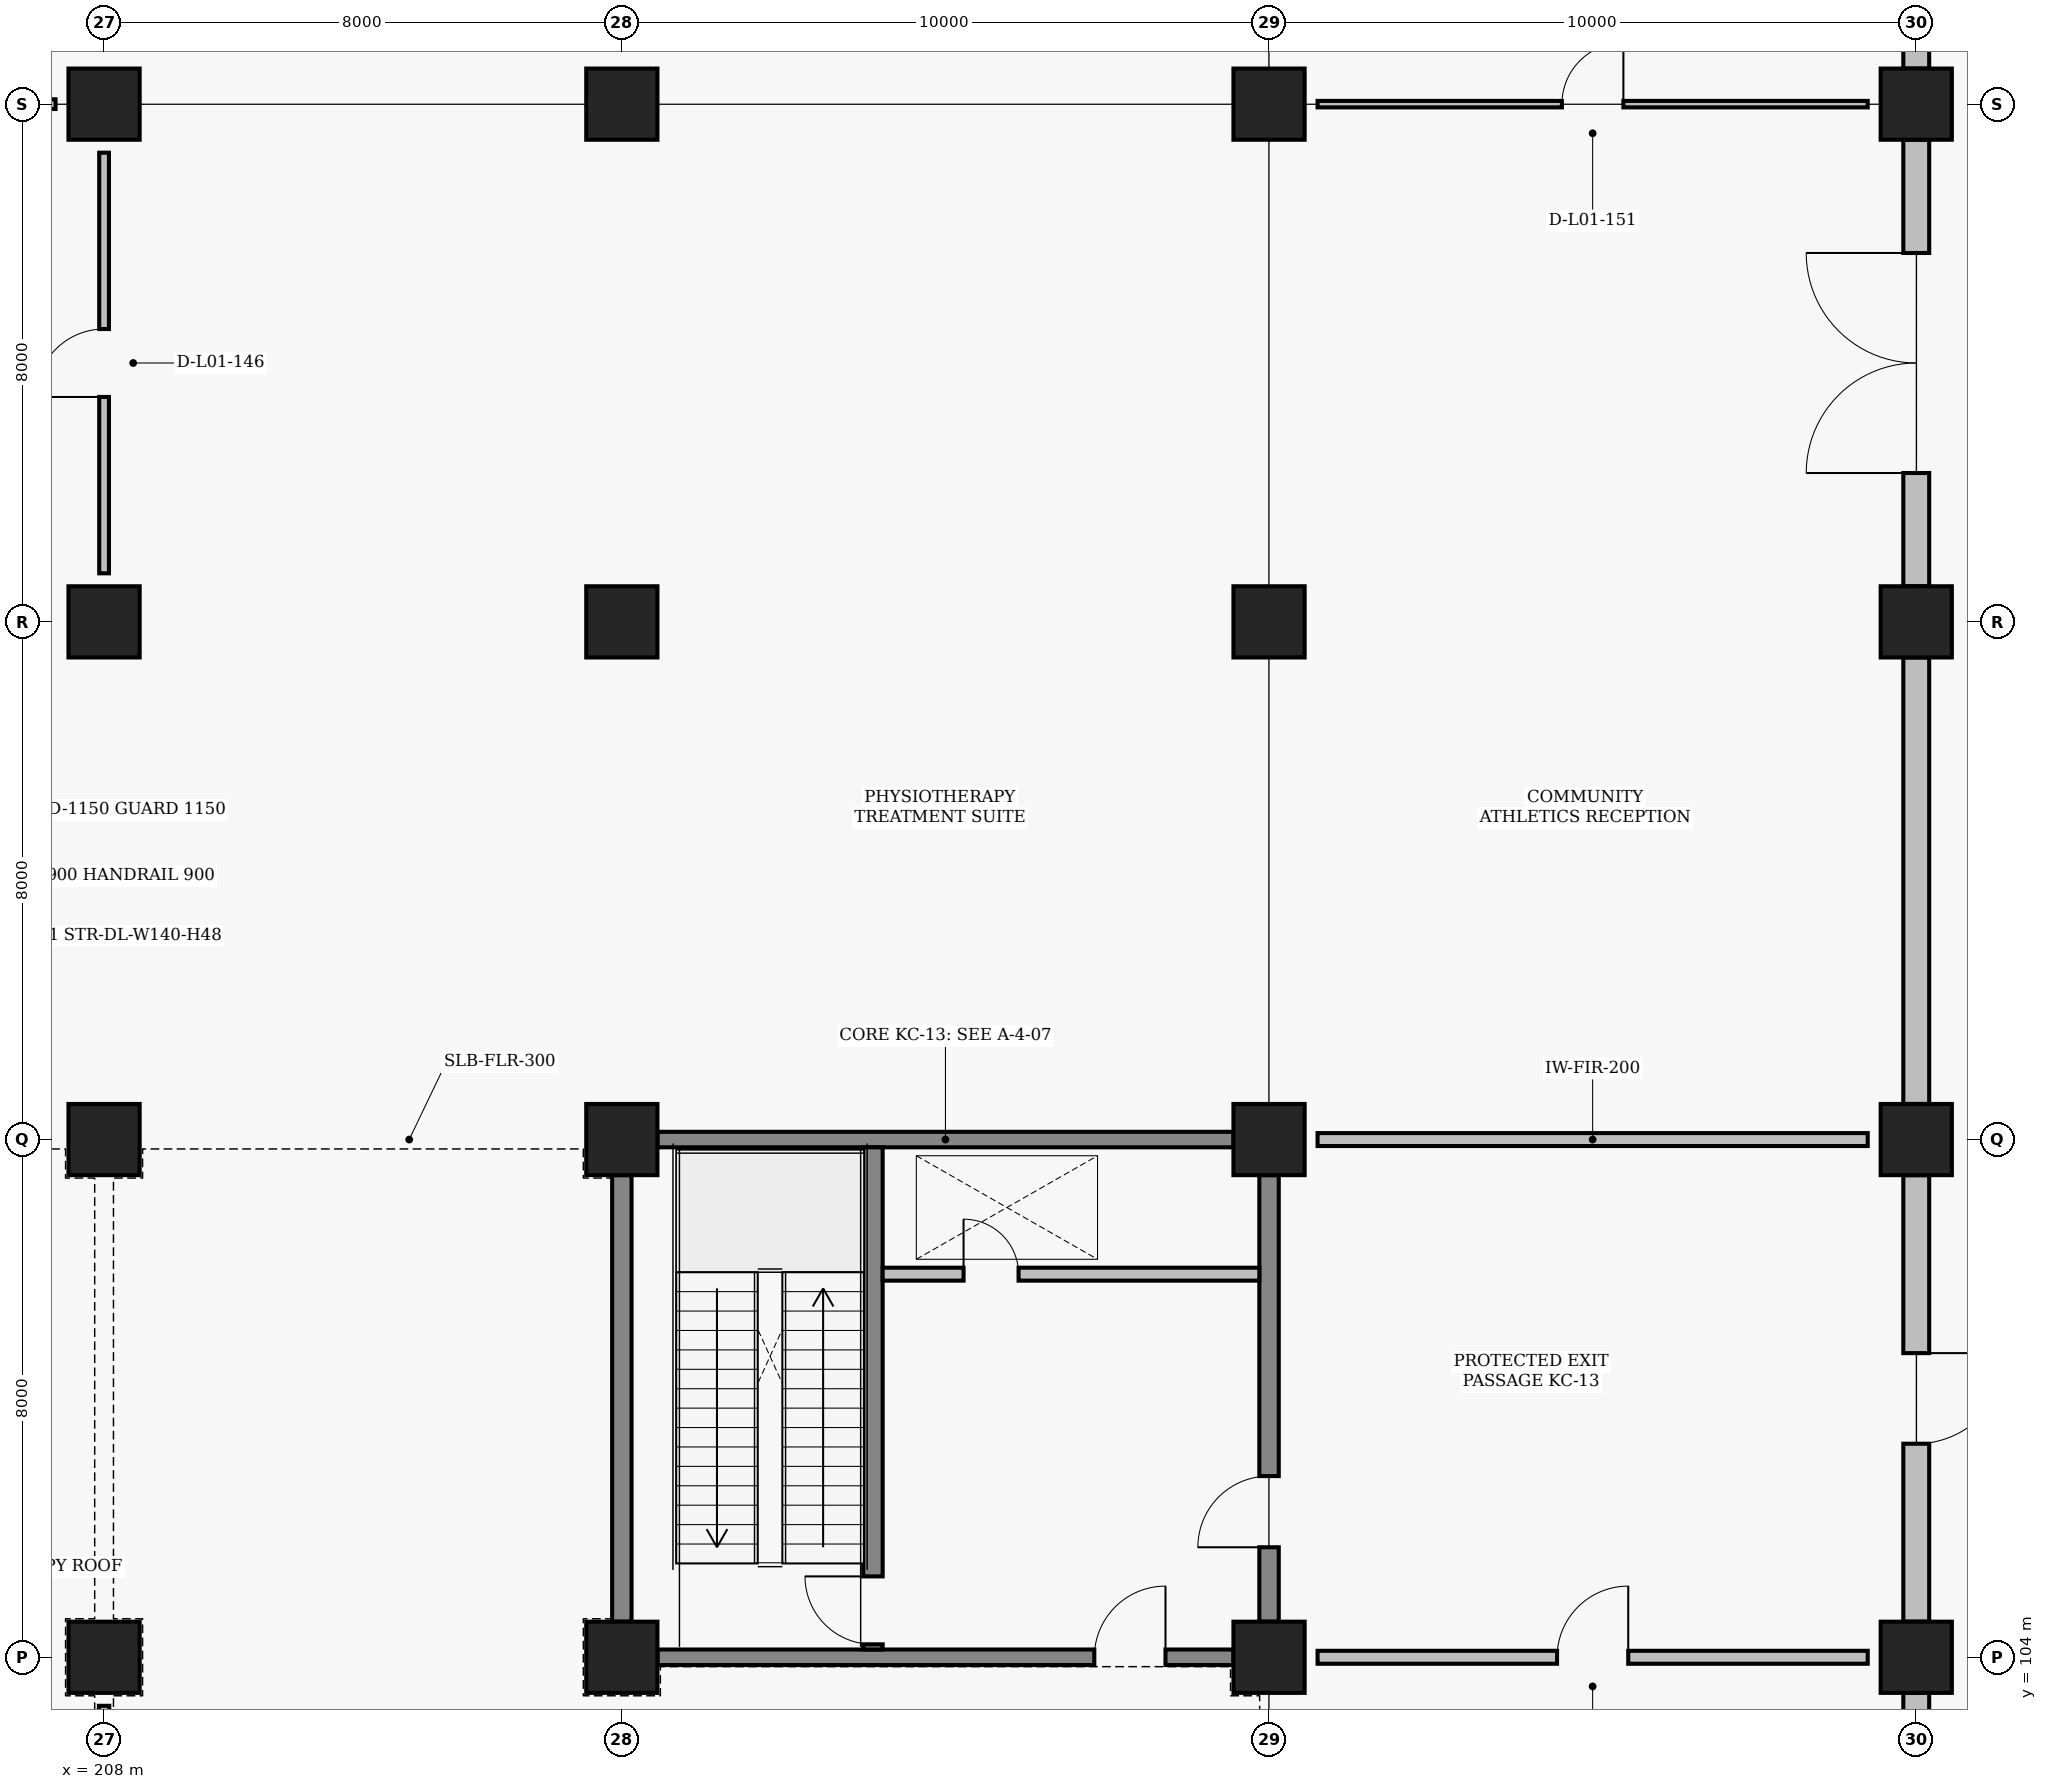
"""IFC4 building model, lengths in metres.
Left out: names, types, materials, properties, quantities, classifications, styles, units other than length and angle.
Written with IfcOpenShell. Run it as: python <this file> out.ifc"""

import sys

from ifc_helpers import new_model, si_unit, direction, frame, frame_2d, origin, origin_2d, place, context, subcontext, project, spatial, rectangle, extrude, element, fill, save


model = new_model("IFC4")
c1 = context("Model", 3, precision=1e-05, world=origin(), true_north=direction((0.0, 1.0)))
c2 = subcontext(c1, "Body", "Model", "MODEL_VIEW")
j1 = project(units=[si_unit("LENGTHUNIT", "METRE"), si_unit("PLANEANGLEUNIT", "RADIAN")], contexts=[c1])
p1 = place(None, origin())
s1 = spatial("IfcSite", under=j1, at=p1, CompositionType="ELEMENT")
p2 = place(p1, origin())
s2 = spatial("IfcBuilding", under=s1, at=p2, CompositionType="ELEMENT")
p3 = place(p2, origin())
s3 = spatial("IfcBuildingStorey", under=s2, at=p3, CompositionType="ELEMENT", Elevation=0.0)
for number, where, z_axis, x_axis in (
    (1, (208.0, 104.0, 0.0), (0.0, 0.0, 1.0), (1.0, 0.0, 0.0)),
    (2, (208.0, 112.0, 0.0), (0.0, 0.0, 1.0), (1.0, 0.0, 0.0)),
    (3, (208.0, 120.0, 0.0), (0.0, 0.0, 1.0), (1.0, 0.0, 0.0)),
    (4, (208.0, 128.0, 0.0), (0.0, 0.0, 1.0), (1.0, 0.0, 0.0)),
    (5, (216.0, 104.0, 0.0), (0.0, 0.0, 1.0), (1.0, 0.0, 0.0)),
    (6, (216.0, 112.0, 0.0), (0.0, 0.0, 1.0), (1.0, 0.0, 0.0)),
    (7, (216.0, 120.0, 0.0), (0.0, 0.0, 1.0), (1.0, 0.0, 0.0)),
    (8, (216.0, 128.0, 0.0), (0.0, 0.0, 1.0), (1.0, 0.0, 0.0)),
    (9, (226.0, 104.0, 0.0), (0.0, 0.0, 1.0), (1.0, 0.0, 0.0)),
    (10, (226.0, 112.0, 0.0), (0.0, 0.0, 1.0), (1.0, 0.0, 0.0)),
    (11, (226.0, 120.0, 0.0), (0.0, 0.0, 1.0), (1.0, 0.0, 0.0)),
    (12, (226.0, 128.0, 0.0), (0.0, 0.0, 1.0), (1.0, 0.0, 0.0)),
    (13, (236.0, 104.0, 0.0), (0.0, 0.0, 1.0), (1.0, 0.0, 0.0)),
    (14, (236.0, 112.0, 0.0), (0.0, 0.0, 1.0), (1.0, 0.0, 0.0)),
    (15, (236.0, 120.0, 0.0), (0.0, 0.0, 1.0), (1.0, 0.0, 0.0)),
    (16, (236.0, 128.0, 0.0), (0.0, 0.0, 1.0), (1.0, 0.0, 0.0)),
):
    element("IfcColumn", number, at=place(p3, frame(where, z_axis=z_axis, x_axis=x_axis)), inside=s3, PredefinedType="COLUMN", context=c2, shape_type="SweptSolid", body=[
        extrude(rectangle(XDim=1.1, YDim=1.1, at=origin_2d()), origin(), (0.0, 0.0, 1.0), 4.8),
    ])
p4 = place(p3, frame((236.0, 96.55, 0.0), z_axis=(0.0, 0.0, 1.0), x_axis=(0.0, 1.0, 0.0)))
e17 = element("IfcWall", 17, at=p4, inside=s3, PredefinedType="SOLIDWALL", context=c2, shape_type="SweptSolid", body=[
    extrude(rectangle(XDim=6.9, YDim=0.4, at=frame_2d((3.45, 0.0))), origin(), (0.0, 0.0, 1.0), 3.81),
])
p5 = place(p4, frame((2.15, 0.0, 0.0)))
e18 = element("IfcOpeningElement", 18, at=p5, cuts=e17, PredefinedType="OPENING", context=c2, shape_type="SweptSolid", body=[
    extrude(rectangle(XDim=2.6, YDim=2.5, at=frame_2d((1.3, 1.25))), frame((0.0, 0.21, 0.0), z_axis=(0.0, -1.0, 0.0), x_axis=(1.0, 0.0, 0.0)), (0.0, 0.0, 1.0), 0.42),
])
p6 = place(p3, frame((236.0, 111.45, 0.0), z_axis=(0.0, 0.0, 1.0), x_axis=(0.0, -1.0, 0.0)))
e19 = element("IfcWall", 19, at=p6, inside=s3, PredefinedType="SOLIDWALL", context=c2, shape_type="SweptSolid", body=[
    extrude(rectangle(XDim=6.9, YDim=0.4, at=frame_2d((3.45, 0.0))), origin(), (0.0, 0.0, 1.0), 3.81),
])
p7 = place(p6, frame((2.75, 0.0, 0.0)))
e20 = element("IfcOpeningElement", 20, at=p7, cuts=e19, PredefinedType="OPENING", context=c2, shape_type="SweptSolid", body=[
    extrude(rectangle(XDim=1.4, YDim=2.2, at=frame_2d((0.7, 1.1))), frame((0.0, 0.21, 0.0), z_axis=(0.0, -1.0, 0.0), x_axis=(1.0, 0.0, 0.0)), (0.0, 0.0, 1.0), 0.42),
])
p8 = place(p3, frame((236.0, 112.55, 0.0), z_axis=(0.0, 0.0, 1.0), x_axis=(0.0, 1.0, 0.0)))
e21 = element("IfcWall", 21, at=p8, inside=s3, PredefinedType="SOLIDWALL", context=c2, shape_type="SweptSolid", body=[
    extrude(rectangle(XDim=6.9, YDim=0.4, at=frame_2d((3.45, 0.0))), origin(), (0.0, 0.0, 1.0), 3.81),
])
p9 = place(p3, frame((236.0, 120.55, 0.0), z_axis=(0.0, 0.0, 1.0), x_axis=(0.0, 1.0, 0.0)))
e22 = element("IfcWall", 22, at=p9, inside=s3, PredefinedType="SOLIDWALL", context=c2, shape_type="SweptSolid", body=[
    extrude(rectangle(XDim=6.9, YDim=0.4, at=frame_2d((3.45, 0.0))), origin(), (0.0, 0.0, 1.0), 3.81),
])
p10 = place(p9, frame((1.75, 0.0, 0.0)))
e23 = element("IfcOpeningElement", 23, at=p10, cuts=e22, PredefinedType="OPENING", context=c2, shape_type="SweptSolid", body=[
    extrude(rectangle(XDim=3.4, YDim=2.75, at=frame_2d((1.7, 1.375))), frame((0.0, 0.21, 0.0), z_axis=(0.0, -1.0, 0.0), x_axis=(1.0, 0.0, 0.0)), (0.0, 0.0, 1.0), 0.42),
])
p11 = place(p3, frame((236.0, 128.55, 0.0), z_axis=(0.0, 0.0, 1.0), x_axis=(0.0, 1.0, 0.0)))
e24 = element("IfcWall", 24, at=p11, inside=s3, PredefinedType="SOLIDWALL", context=c2, shape_type="SweptSolid", body=[
    extrude(rectangle(XDim=6.9, YDim=0.4, at=frame_2d((3.45, 0.0))), origin(), (0.0, 0.0, 1.0), 3.81),
])
p12 = place(p3, frame((216.55, 104.0, 0.0), z_axis=(0.0, 0.0, 1.0), x_axis=(1.0, 0.0, 0.0)))
e25 = element("IfcWall", 25, at=p12, inside=s3, PredefinedType="SHEAR", context=c2, shape_type="SweptSolid", body=[
    extrude(rectangle(XDim=8.9, YDim=0.24, at=frame_2d((4.45, 0.0))), origin(), (0.0, 0.0, 1.0), 3.81),
])
p13 = place(p12, frame((6.75, 0.0, 0.0)))
e26 = element("IfcOpeningElement", 26, at=p13, cuts=e25, PredefinedType="OPENING", context=c2, shape_type="SweptSolid", body=[
    extrude(rectangle(XDim=1.1, YDim=2.2, at=frame_2d((0.55, 1.1))), frame((0.0, 0.13, 0.0), z_axis=(0.0, -1.0, 0.0), x_axis=(1.0, 0.0, 0.0)), (0.0, 0.0, 1.0), 0.26),
])
p14 = place(p3, frame((216.55, 112.0, 0.0), z_axis=(0.0, 0.0, 1.0), x_axis=(1.0, 0.0, 0.0)))
e27 = element("IfcWall", 27, at=p14, inside=s3, PredefinedType="SHEAR", context=c2, shape_type="SweptSolid", body=[
    extrude(rectangle(XDim=8.9, YDim=0.24, at=frame_2d((4.45, 0.0))), origin(), (0.0, 0.0, 1.0), 3.66),
])
p15 = place(p3, frame((216.0, 104.55, 0.0), z_axis=(0.0, 0.0, 1.0), x_axis=(0.0, 1.0, 0.0)))
e28 = element("IfcWall", 28, at=p15, inside=s3, PredefinedType="SHEAR", context=c2, shape_type="SweptSolid", body=[
    extrude(rectangle(XDim=6.9, YDim=0.3, at=frame_2d((3.45, 0.0))), origin(), (0.0, 0.0, 1.0), 3.66),
])
p16 = place(p3, frame((226.0, 104.55, 0.0), z_axis=(0.0, 0.0, 1.0), x_axis=(0.0, 1.0, 0.0)))
e29 = element("IfcWall", 29, at=p16, inside=s3, PredefinedType="SHEAR", context=c2, shape_type="SweptSolid", body=[
    extrude(rectangle(XDim=6.9, YDim=0.3, at=frame_2d((3.45, 0.0))), origin(), (0.0, 0.0, 1.0), 3.81),
])
p17 = place(p16, frame((1.15, 0.0, 0.0)))
e30 = element("IfcOpeningElement", 30, at=p17, cuts=e29, PredefinedType="OPENING", context=c2, shape_type="SweptSolid", body=[
    extrude(rectangle(XDim=1.1, YDim=2.2, at=frame_2d((0.55, 1.1))), frame((0.0, 0.16, 0.0), z_axis=(0.0, -1.0, 0.0), x_axis=(1.0, 0.0, 0.0)), (0.0, 0.0, 1.0), 0.32),
])
p18 = place(p3, frame((219.88, 104.12, 0.0), z_axis=(0.0, 0.0, 1.0), x_axis=(0.0, 1.0, 0.0)))
e31 = element("IfcWall", 31, at=p18, inside=s3, PredefinedType="SHEAR", context=c2, shape_type="SweptSolid", body=[
    extrude(rectangle(XDim=7.76, YDim=0.3, at=frame_2d((3.88, 0.0))), origin(), (0.0, 0.0, 1.0), 4.01),
])
p19 = place(p18, frame((0.08, 0.0, 0.0)))
e32 = element("IfcOpeningElement", 32, at=p19, cuts=e31, PredefinedType="OPENING", context=c2, shape_type="SweptSolid", body=[
    extrude(rectangle(XDim=1.05, YDim=2.15, at=frame_2d((0.525, 1.075))), frame((0.0, 0.16, 0.0), z_axis=(0.0, -1.0, 0.0), x_axis=(1.0, 0.0, 0.0)), (0.0, 0.0, 1.0), 0.32),
])
p20 = place(p3, frame((220.03, 109.92, 0.0), z_axis=(0.0, 0.0, 1.0), x_axis=(1.0, 0.0, 0.0)))
e33 = element("IfcWall", 33, at=p20, inside=s3, PredefinedType="PARTITIONING", context=c2, shape_type="SweptSolid", body=[
    extrude(rectangle(XDim=5.82, YDim=0.2, at=frame_2d((2.91, 0.0))), origin(), (0.0, 0.0, 1.0), 3.81),
])
p21 = place(p20, frame((1.25, 0.0, 0.0)))
e34 = element("IfcOpeningElement", 34, at=p21, cuts=e33, PredefinedType="OPENING", context=c2, shape_type="SweptSolid", body=[
    extrude(rectangle(XDim=0.85, YDim=2.05, at=frame_2d((0.425, 1.025))), frame((0.0, 0.11, 0.0), z_axis=(0.0, -1.0, 0.0), x_axis=(1.0, 0.0, 0.0)), (0.0, 0.0, 1.0), 0.22),
])
p22 = place(p3, frame((226.75, 104.0, 0.0), z_axis=(0.0, 0.0, 1.0), x_axis=(1.0, 0.0, 0.0)))
e35 = element("IfcWall", 35, at=p22, inside=s3, PredefinedType="PARTITIONING", context=c2, shape_type="SweptSolid", body=[
    extrude(rectangle(XDim=8.5, YDim=0.2, at=frame_2d((4.25, 0.0))), origin(), (0.0, 0.0, 1.0), 3.81),
])
p23 = place(p22, frame((3.7, 0.0, 0.0)))
e36 = element("IfcOpeningElement", 36, at=p23, cuts=e35, PredefinedType="OPENING", context=c2, shape_type="SweptSolid", body=[
    extrude(rectangle(XDim=1.1, YDim=2.2, at=frame_2d((0.55, 1.1))), frame((0.0, 0.11, 0.0), z_axis=(0.0, -1.0, 0.0), x_axis=(1.0, 0.0, 0.0)), (0.0, 0.0, 1.0), 0.22),
])
p24 = place(p3, frame((226.75, 112.0, 0.0), z_axis=(0.0, 0.0, 1.0), x_axis=(1.0, 0.0, 0.0)))
e37 = element("IfcWall", 37, at=p24, inside=s3, PredefinedType="PARTITIONING", context=c2, shape_type="SweptSolid", body=[
    extrude(rectangle(XDim=8.5, YDim=0.2, at=frame_2d((4.25, 0.0))), origin(), (0.0, 0.0, 1.0), 3.81),
])
p25 = place(p3, frame((200.75, 128.0, 0.0), z_axis=(0.0, 0.0, 1.0), x_axis=(1.0, 0.0, 0.0)))
e38 = element("IfcWall", 38, at=p25, inside=s3, PredefinedType="PARTITIONING", context=c2, shape_type="SweptSolid", body=[
    extrude(rectangle(XDim=6.5, YDim=0.15, at=frame_2d((3.25, 0.0))), origin(), (0.0, 0.0, 1.0), 3.91),
])
p26 = place(p25, frame((2.725, 0.0, 0.0)))
e39 = element("IfcOpeningElement", 39, at=p26, cuts=e38, PredefinedType="OPENING", context=c2, shape_type="SweptSolid", body=[
    extrude(rectangle(XDim=1.05, YDim=2.15, at=frame_2d((0.525, 1.075))), frame((0.0, 0.085, 0.0), z_axis=(0.0, -1.0, 0.0), x_axis=(1.0, 0.0, 0.0)), (0.0, 0.0, 1.0), 0.17),
])
p27 = place(p3, frame((208.0, 96.75, 0.0), z_axis=(0.0, 0.0, 1.0), x_axis=(0.0, 1.0, 0.0)))
e40 = element("IfcWall", 40, at=p27, inside=s3, PredefinedType="PARTITIONING", context=c2, shape_type="SweptSolid", body=[
    extrude(rectangle(XDim=6.5, YDim=0.16, at=frame_2d((3.25, 0.0))), origin(), (0.0, 0.0, 1.0), 3.81),
])
p28 = place(p27, frame((2.775, 0.0, 0.0)))
e41 = element("IfcOpeningElement", 41, at=p28, cuts=e40, PredefinedType="OPENING", context=c2, shape_type="SweptSolid", body=[
    extrude(rectangle(XDim=0.95, YDim=2.1, at=frame_2d((0.475, 1.05))), frame((0.0, 0.09, 0.0), z_axis=(0.0, -1.0, 0.0), x_axis=(1.0, 0.0, 0.0)), (0.0, 0.0, 1.0), 0.18),
])
p29 = place(p3, frame((208.0, 120.75, 0.0), z_axis=(0.0, 0.0, 1.0), x_axis=(0.0, 1.0, 0.0)))
e42 = element("IfcWall", 42, at=p29, inside=s3, PredefinedType="PARTITIONING", context=c2, shape_type="SweptSolid", body=[
    extrude(rectangle(XDim=6.5, YDim=0.15, at=frame_2d((3.25, 0.0))), origin(), (0.0, 0.0, 1.0), 3.81),
])
p30 = place(p29, frame((2.725, 0.0, 0.0)))
e43 = element("IfcOpeningElement", 43, at=p30, cuts=e42, PredefinedType="OPENING", context=c2, shape_type="SweptSolid", body=[
    extrude(rectangle(XDim=1.05, YDim=2.15, at=frame_2d((0.525, 1.075))), frame((0.0, 0.085, 0.0), z_axis=(0.0, -1.0, 0.0), x_axis=(1.0, 0.0, 0.0)), (0.0, 0.0, 1.0), 0.17),
])
p31 = place(p3, frame((226.75, 128.0, 0.0), z_axis=(0.0, 0.0, 1.0), x_axis=(1.0, 0.0, 0.0)))
e44 = element("IfcWall", 44, at=p31, inside=s3, PredefinedType="PARTITIONING", context=c2, shape_type="SweptSolid", body=[
    extrude(rectangle(XDim=8.5, YDim=0.1, at=frame_2d((4.25, 0.0))), origin(), (0.0, 0.0, 1.0), 3.81),
])
p32 = place(p31, frame((3.775, 0.0, 0.0)))
e45 = element("IfcOpeningElement", 45, at=p32, cuts=e44, PredefinedType="OPENING", context=c2, shape_type="SweptSolid", body=[
    extrude(rectangle(XDim=0.95, YDim=2.1, at=frame_2d((0.475, 1.05))), frame((0.0, 0.06, 0.0), z_axis=(0.0, -1.0, 0.0), x_axis=(1.0, 0.0, 0.0)), (0.0, 0.0, 1.0), 0.12),
])
p33 = place(p7, origin())
e46 = element("IfcDoor", 46, at=p33, inside=s3, OperationType="SINGLE_SWING_LEFT", PredefinedType="DOOR", context=c2, shape_type="SweptSolid", body=[
    extrude(rectangle(XDim=1.4, YDim=2.2, at=frame_2d((0.7, 1.1))), frame((0.0, 0.025, 0.0), z_axis=(0.0, -1.0, 0.0), x_axis=(1.0, 0.0, 0.0)), (0.0, 0.0, 1.0), 0.05),
])
fill(e20, e46)
p34 = place(p10, origin())
e47 = element("IfcDoor", 47, at=p34, inside=s3, OperationType="DOUBLE_SWING_LEFT", PredefinedType="DOOR", context=c2, shape_type="SweptSolid", body=[
    extrude(rectangle(XDim=3.4, YDim=2.75, at=frame_2d((1.7, 1.375))), frame((0.0, 0.025, 0.0), z_axis=(0.0, -1.0, 0.0), x_axis=(1.0, 0.0, 0.0)), (0.0, 0.0, 1.0), 0.05),
])
fill(e23, e47)
p35 = place(p13, origin())
e48 = element("IfcDoor", 48, at=p35, inside=s3, OperationType="SINGLE_SWING_RIGHT", PredefinedType="DOOR", context=c2, shape_type="SweptSolid", body=[
    extrude(rectangle(XDim=1.1, YDim=2.2, at=frame_2d((0.55, 1.1))), frame((0.0, 0.025, 0.0), z_axis=(0.0, -1.0, 0.0), x_axis=(1.0, 0.0, 0.0)), (0.0, 0.0, 1.0), 0.05),
])
fill(e26, e48)
p36 = place(p17, origin())
e49 = element("IfcDoor", 49, at=p36, inside=s3, OperationType="SINGLE_SWING_LEFT", PredefinedType="DOOR", context=c2, shape_type="SweptSolid", body=[
    extrude(rectangle(XDim=1.1, YDim=2.2, at=frame_2d((0.55, 1.1))), frame((0.0, 0.025, 0.0), z_axis=(0.0, -1.0, 0.0), x_axis=(1.0, 0.0, 0.0)), (0.0, 0.0, 1.0), 0.05),
])
fill(e30, e49)
p37 = place(p19, origin())
e50 = element("IfcDoor", 50, at=p37, inside=s3, OperationType="SINGLE_SWING_RIGHT", PredefinedType="DOOR", context=c2, shape_type="SweptSolid", body=[
    extrude(rectangle(XDim=1.05, YDim=2.15, at=frame_2d((0.525, 1.075))), frame((0.0, 0.025, 0.0), z_axis=(0.0, -1.0, 0.0), x_axis=(1.0, 0.0, 0.0)), (0.0, 0.0, 1.0), 0.05),
])
fill(e32, e50)
p38 = place(p21, origin())
e51 = element("IfcDoor", 51, at=p38, inside=s3, OperationType="SINGLE_SWING_LEFT", PredefinedType="TRAPDOOR", context=c2, shape_type="SweptSolid", body=[
    extrude(rectangle(XDim=0.85, YDim=2.05, at=frame_2d((0.425, 1.025))), frame((0.0, 0.025, 0.0), z_axis=(0.0, -1.0, 0.0), x_axis=(1.0, 0.0, 0.0)), (0.0, 0.0, 1.0), 0.05),
])
fill(e34, e51)
p39 = place(p23, origin())
e52 = element("IfcDoor", 52, at=p39, inside=s3, OperationType="SINGLE_SWING_RIGHT", PredefinedType="DOOR", context=c2, shape_type="SweptSolid", body=[
    extrude(rectangle(XDim=1.1, YDim=2.2, at=frame_2d((0.55, 1.1))), frame((0.0, 0.025, 0.0), z_axis=(0.0, -1.0, 0.0), x_axis=(1.0, 0.0, 0.0)), (0.0, 0.0, 1.0), 0.05),
])
fill(e36, e52)
p40 = place(p30, origin())
e53 = element("IfcDoor", 53, at=p40, inside=s3, OperationType="SINGLE_SWING_LEFT", PredefinedType="DOOR", context=c2, shape_type="SweptSolid", body=[
    extrude(rectangle(XDim=1.05, YDim=2.15, at=frame_2d((0.525, 1.075))), frame((0.0, 0.025, 0.0), z_axis=(0.0, -1.0, 0.0), x_axis=(1.0, 0.0, 0.0)), (0.0, 0.0, 1.0), 0.05),
])
fill(e43, e53)
p41 = place(p32, origin())
e54 = element("IfcDoor", 54, at=p41, inside=s3, OperationType="SINGLE_SWING_RIGHT", PredefinedType="DOOR", context=c2, shape_type="SweptSolid", body=[
    extrude(rectangle(XDim=0.95, YDim=2.1, at=frame_2d((0.475, 1.05))), frame((0.0, 0.025, 0.0), z_axis=(0.0, -1.0, 0.0), x_axis=(1.0, 0.0, 0.0)), (0.0, 0.0, 1.0), 0.05),
])
fill(e45, e54)
save(model, sys.argv[1])
